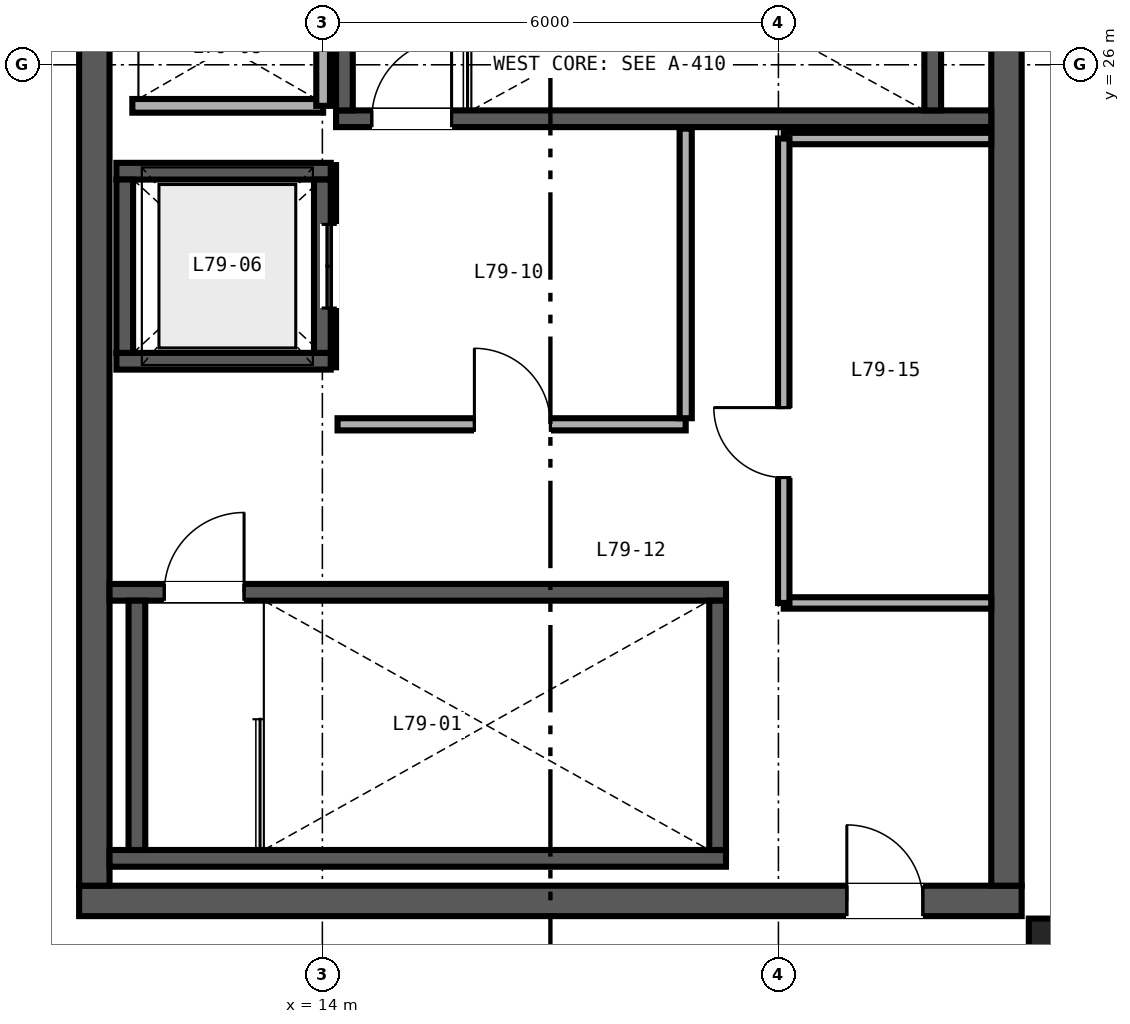
"""IFC4 building model, lengths in metres.
Left out: names, types, materials, properties, quantities, classifications, styles, units other than length and angle.
Written with IfcOpenShell. Run it as: python <this file> out.ifc"""

import sys

from ifc_helpers import new_model, si_unit, direction, frame, frame_2d, origin, origin_2d, place, context, subcontext, project, spatial, rectangle, i_section, extrude, source, transform, mapped, element, fill, save


model = new_model("IFC4")
c1 = context("Model", 3, precision=1e-05, world=origin(), true_north=direction((0.0, 1.0)))
c2 = subcontext(c1, "Body", "Model", "MODEL_VIEW")
j1 = project(units=[si_unit("LENGTHUNIT", "METRE"), si_unit("PLANEANGLEUNIT", "RADIAN")], contexts=[c1])
p1 = place(None, origin())
s1 = spatial("IfcSite", under=j1, at=p1, CompositionType="ELEMENT")
p2 = place(p1, origin())
s2 = spatial("IfcBuilding", under=s1, at=p2, CompositionType="ELEMENT")
p3 = place(p2, frame((0.0, 0.0, 309.6)))
s3 = spatial("IfcBuildingStorey", under=s2, at=p3, CompositionType="ELEMENT", Elevation=309.6)
p4 = place(p3, frame((10.8, 15.0, 0.0), z_axis=(0.0, 0.0, 1.0), x_axis=(1.0, 0.0, 0.0)))
e1 = element("IfcWall", 1, at=p4, inside=s3, PredefinedType="SHEAR", context=c2, shape_type="SweptSolid", body=[
    extrude(rectangle(XDim=12.4, YDim=0.4, at=frame_2d((6.2, 0.0))), origin(), (0.0, 0.0, 1.0), 5.0),
])
p5 = place(p4, frame((10.1, 0.0, 0.0)))
e2 = element("IfcOpeningElement", 2, at=p5, cuts=e1, PredefinedType="OPENING", context=c2, shape_type="SweptSolid", body=[
    extrude(rectangle(XDim=1.0, YDim=2.15, at=frame_2d((0.5, 1.075))), frame((0.0, 0.21, 0.0), z_axis=(0.0, -1.0, 0.0), x_axis=(1.0, 0.0, 0.0)), (0.0, 0.0, 1.0), 0.42),
])
for number, where, z_axis, x_axis in (
    (3, (11.0, 15.2, 0.0), (0.0, 0.0, 1.0), (0.0, 1.0, 0.0)),
    (4, (23.0, 15.2, 0.0), (0.0, 0.0, 1.0), (0.0, 1.0, 0.0)),
):
    element("IfcWall", number, at=place(p3, frame(where, z_axis=z_axis, x_axis=x_axis)), inside=s3, PredefinedType="SHEAR", context=c2, shape_type="SweptSolid", body=[
        extrude(rectangle(XDim=21.6, YDim=0.4, at=frame_2d((10.8, 0.0))), origin(), (0.0, 0.0, 1.0), 5.0),
    ])
p6 = place(p3, frame((11.2, 15.56, 0.0), z_axis=(0.0, 0.0, 1.0), x_axis=(1.0, 0.0, 0.0)))
e5 = element("IfcWall", 5, at=p6, inside=s3, PredefinedType="SHEAR", context=c2, shape_type="SweptSolid", body=[
    extrude(rectangle(XDim=8.11, YDim=0.22, at=frame_2d((4.055, 0.0))), origin(), (0.0, 0.0, 1.0), 5.0),
])
p7 = place(p3, frame((11.2, 19.06, 0.0), z_axis=(0.0, 0.0, 1.0), x_axis=(1.0, 0.0, 0.0)))
e6 = element("IfcWall", 6, at=p7, inside=s3, PredefinedType="SHEAR", context=c2, shape_type="SweptSolid", body=[
    extrude(rectangle(XDim=8.11, YDim=0.22, at=frame_2d((4.055, 0.0))), origin(), (0.0, 0.0, 1.0), 5.0),
])
p8 = place(p7, frame((0.72, 0.0, 0.0)))
e7 = element("IfcOpeningElement", 7, at=p8, cuts=e6, PredefinedType="OPENING", context=c2, shape_type="SweptSolid", body=[
    extrude(rectangle(XDim=1.05, YDim=2.15, at=frame_2d((0.525, 1.075))), frame((0.0, 0.12, 0.0), z_axis=(0.0, -1.0, 0.0), x_axis=(1.0, 0.0, 0.0)), (0.0, 0.0, 1.0), 0.24),
])
for number, where, z_axis, x_axis in (
    (8, (11.56, 15.67, 0.0), (0.0, 0.0, 1.0), (0.0, 1.0, 0.0)),
    (9, (19.2, 15.67, 0.0), (0.0, 0.0, 1.0), (0.0, 1.0, 0.0)),
):
    element("IfcWall", number, at=place(p3, frame(where, z_axis=z_axis, x_axis=x_axis)), inside=s3, PredefinedType="SHEAR", context=c2, shape_type="SweptSolid", body=[
        extrude(rectangle(XDim=3.28, YDim=0.22, at=frame_2d((1.64, 0.0))), origin(), (0.0, 0.0, 1.0), 5.0),
    ])
p9 = place(p3, frame((14.18, 25.29, 0.0), z_axis=(0.0, 0.0, 1.0), x_axis=(1.0, 0.0, 0.0)))
e10 = element("IfcWall", 10, at=p9, inside=s3, PredefinedType="SHEAR", context=c2, shape_type="SweptSolid", body=[
    extrude(rectangle(XDim=8.62, YDim=0.22, at=frame_2d((4.31, 0.0))), origin(), (0.0, 0.0, 1.0), 5.0),
])
p10 = place(p9, frame((0.47, 0.0, 0.0)))
e11 = element("IfcOpeningElement", 11, at=p10, cuts=e10, PredefinedType="OPENING", context=c2, shape_type="SweptSolid", body=[
    extrude(rectangle(XDim=1.05, YDim=2.15, at=frame_2d((0.525, 1.075))), frame((0.0, 0.12, 0.0), z_axis=(0.0, -1.0, 0.0), x_axis=(1.0, 0.0, 0.0)), (0.0, 0.0, 1.0), 0.24),
])
for number, where, z_axis, x_axis in (
    (12, (14.29, 25.4, 0.0), (0.0, 0.0, 1.0), (0.0, 1.0, 0.0)),
    (13, (22.03, 25.4, 0.0), (0.0, 0.0, 1.0), (0.0, 1.0, 0.0)),
):
    element("IfcWall", number, at=place(p3, frame(where, z_axis=z_axis, x_axis=x_axis)), inside=s3, PredefinedType="SHEAR", context=c2, shape_type="SweptSolid", body=[
        extrude(rectangle(XDim=3.28, YDim=0.22, at=frame_2d((1.64, 0.0))), origin(), (0.0, 0.0, 1.0), 5.0),
    ])
m1 = source(origin(), c2, "Body", "SweptSolid", [
    extrude(i_section(OverallWidth=0.412, OverallDepth=0.435, WebThickness=0.036, FlangeThickness=0.057, FilletRadius=0.025, at=origin_2d()), origin(), (0.0, 0.0, 1.0), 5.0),
])
p11 = place(p3, frame((23.5, 14.55, 0.0), z_axis=(0.0, 0.0, 1.0), x_axis=(1.0, 0.0, 0.0)))
e14 = element("IfcColumn", 14, at=p11, inside=s3, PredefinedType="COLUMN", context=c2, shape_type="MappedRepresentation", body=[
    mapped(m1, transform((0.0, 0.0, 0.0), scale=1.0)),
])
for number, where, z_axis, x_axis in (
    (15, (11.5, 22.11, 0.0), (0.0, 0.0, 1.0), (1.0, 0.0, 0.0)),
    (16, (11.5, 24.59, 0.0), (0.0, 0.0, 1.0), (1.0, 0.0, 0.0)),
):
    element("IfcWall", number, at=place(p3, frame(where, z_axis=z_axis, x_axis=x_axis)), inside=s3, PredefinedType="SOLIDWALL", context=c2, shape_type="SweptSolid", body=[
        extrude(rectangle(XDim=2.5, YDim=0.18, at=frame_2d((1.25, 0.0))), origin(), (0.0, 0.0, 1.0), 4.591),
    ])
p12 = place(p3, frame((14.09, 22.02, 0.0), z_axis=(0.0, 0.0, 1.0), x_axis=(0.0, 1.0, 0.0)))
e17 = element("IfcWall", 17, at=p12, inside=s3, PredefinedType="SOLIDWALL", context=c2, shape_type="SweptSolid", body=[
    extrude(rectangle(XDim=2.66, YDim=0.18, at=frame_2d((1.33, 0.0))), origin(), (0.0, 0.0, 1.0), 4.591),
])
p13 = place(p12, frame((0.78, 0.0, 0.0)))
e18 = element("IfcOpeningElement", 18, at=p13, cuts=e17, PredefinedType="OPENING", context=c2, shape_type="SweptSolid", body=[
    extrude(rectangle(XDim=1.1, YDim=2.2, at=frame_2d((0.55, 1.1))), frame((0.0, 0.1, 0.0), z_axis=(0.0, -1.0, 0.0), x_axis=(1.0, 0.0, 0.0)), (0.0, 0.0, 1.0), 0.2),
])
p14 = place(p3, frame((11.5, 25.46, 0.0), z_axis=(0.0, 0.0, 1.0), x_axis=(1.0, 0.0, 0.0)))
e19 = element("IfcWall", 19, at=p14, inside=s3, PredefinedType="SOLIDWALL", context=c2, shape_type="SweptSolid", body=[
    extrude(rectangle(XDim=2.51, YDim=0.18, at=frame_2d((1.255, 0.0))), origin(), (0.0, 0.0, 1.0), 5.0),
])
p15 = place(p3, frame((14.01, 25.46, 0.0), z_axis=(0.0, 0.0, 1.0), x_axis=(0.0, 1.0, 0.0)))
e20 = element("IfcWall", 20, at=p15, inside=s3, PredefinedType="SOLIDWALL", context=c2, shape_type="SweptSolid", body=[
    extrude(rectangle(XDim=3.08, YDim=0.18, at=frame_2d((1.54, 0.0))), origin(), (0.0, 0.0, 1.0), 5.0),
])
p16 = place(p3, frame((14.2, 21.27, 0.0), z_axis=(0.0, 0.0, 1.0), x_axis=(1.0, 0.0, 0.0)))
e21 = element("IfcWall", 21, at=p16, inside=s3, PredefinedType="PARTITIONING", context=c2, shape_type="SweptSolid", body=[
    extrude(rectangle(XDim=4.58, YDim=0.16, at=frame_2d((2.29, 0.0))), origin(), (0.0, 0.0, 1.0), 5.0),
])
p17 = place(p16, frame((1.8, 0.0, 0.0)))
e22 = element("IfcOpeningElement", 22, at=p17, cuts=e21, PredefinedType="OPENING", context=c2, shape_type="SweptSolid", body=[
    extrude(rectangle(XDim=1.0, YDim=2.15, at=frame_2d((0.5, 1.075))), frame((0.0, 0.09, 0.0), z_axis=(0.0, -1.0, 0.0), x_axis=(1.0, 0.0, 0.0)), (0.0, 0.0, 1.0), 0.18),
])
p18 = place(p3, frame((18.78, 21.35, 0.0), z_axis=(0.0, 0.0, 1.0), x_axis=(0.0, 1.0, 0.0)))
e23 = element("IfcWall", 23, at=p18, inside=s3, PredefinedType="PARTITIONING", context=c2, shape_type="SweptSolid", body=[
    extrude(rectangle(XDim=3.81, YDim=0.16, at=frame_2d((1.905, 0.0))), origin(), (0.0, 0.0, 1.0), 4.591),
])
for number, where, z_axis, x_axis in (
    (24, (20.07, 18.92, 0.0), (0.0, 0.0, 1.0), (1.0, 0.0, 0.0)),
    (25, (20.07, 25.03, 0.0), (0.0, 0.0, 1.0), (1.0, 0.0, 0.0)),
):
    element("IfcWall", number, at=place(p3, frame(where, z_axis=z_axis, x_axis=x_axis)), inside=s3, PredefinedType="PARTITIONING", context=c2, shape_type="SweptSolid", body=[
        extrude(rectangle(XDim=2.73, YDim=0.15, at=frame_2d((1.365, 0.0))), origin(), (0.0, 0.0, 1.0), 5.0),
    ])
p19 = place(p3, frame((20.07, 18.92, 0.0), z_axis=(0.0, 0.0, 1.0), x_axis=(0.0, 1.0, 0.0)))
e26 = element("IfcWall", 26, at=p19, inside=s3, PredefinedType="PARTITIONING", context=c2, shape_type="SweptSolid", body=[
    extrude(rectangle(XDim=6.11, YDim=0.15, at=frame_2d((3.055, 0.0))), origin(), (0.0, 0.0, 1.0), 4.1),
])
p20 = place(p19, frame((1.65, 0.0, 0.0)))
e27 = element("IfcOpeningElement", 27, at=p20, cuts=e26, PredefinedType="OPENING", context=c2, shape_type="SweptSolid", body=[
    extrude(rectangle(XDim=0.92, YDim=2.15, at=frame_2d((0.46, 1.075))), frame((0.0, 0.085, 0.0), z_axis=(0.0, -1.0, 0.0), x_axis=(1.0, 0.0, 0.0)), (0.0, 0.0, 1.0), 0.17),
])
for number, where, z_axis, x_axis in (
    (28, (11.29, 22.1, 5.0), (0.0, 0.0, 1.0), (1.0, 0.0, 0.0)),
    (29, (11.29, 24.6, 5.0), (0.0, 0.0, 1.0), (1.0, 0.0, 0.0)),
):
    element("IfcWall", number, at=place(p3, frame(where, z_axis=z_axis, x_axis=x_axis)), inside=s3, PredefinedType="SHEAR", context=c2, shape_type="SweptSolid", body=[
        extrude(rectangle(XDim=2.82, YDim=0.22, at=frame_2d((1.41, 0.0))), origin(), (0.0, 0.0, 1.0), 3.4),
    ])
for number, where, z_axis, x_axis in (
    (30, (11.4, 22.21, 5.0), (0.0, 0.0, 1.0), (0.0, 1.0, 0.0)),
    (31, (14.0, 22.21, 5.0), (0.0, 0.0, 1.0), (0.0, 1.0, 0.0)),
):
    element("IfcWall", number, at=place(p3, frame(where, z_axis=z_axis, x_axis=x_axis)), inside=s3, PredefinedType="SHEAR", context=c2, shape_type="SweptSolid", body=[
        extrude(rectangle(XDim=2.28, YDim=0.22, at=frame_2d((1.14, 0.0))), origin(), (0.0, 0.0, 1.0), 3.4),
    ])
m2 = source(origin(), c2, "Body", "SweptSolid", [
    extrude(rectangle(XDim=1.05, YDim=2.15, at=frame_2d((0.525, 1.075))), frame((0.0, 0.025, 0.0), z_axis=(0.0, -1.0, 0.0), x_axis=(1.0, 0.0, 0.0)), (0.0, 0.0, 1.0), 0.05),
])
p21 = place(p8, origin())
e32 = element("IfcDoor", 32, at=p21, inside=s3, OperationType="SINGLE_SWING_RIGHT", PredefinedType="DOOR", context=c2, shape_type="MappedRepresentation", body=[
    mapped(m2, transform((0.0, 0.0, 0.0), scale=1.0)),
])
fill(e7, e32)
p22 = place(p10, origin())
e33 = element("IfcDoor", 33, at=p22, inside=s3, OperationType="SINGLE_SWING_RIGHT", PredefinedType="DOOR", context=c2, shape_type="MappedRepresentation", body=[
    mapped(m2, transform((0.0, 0.0, 0.0), scale=1.0)),
])
fill(e11, e33)
m3 = source(origin(), c2, "Body", "SweptSolid", [
    extrude(rectangle(XDim=1.1, YDim=2.2, at=frame_2d((0.55, 1.1))), frame((0.0, 0.025, 0.0), z_axis=(0.0, -1.0, 0.0), x_axis=(1.0, 0.0, 0.0)), (0.0, 0.0, 1.0), 0.05),
])
p23 = place(p13, origin())
e34 = element("IfcDoor", 34, at=p23, inside=s3, OperationType="DOUBLE_DOOR_SLIDING", PredefinedType="DOOR", context=c2, shape_type="MappedRepresentation", body=[
    mapped(m3, transform((0.0, 0.0, 0.0), scale=1.0)),
])
fill(e18, e34)
m4 = source(origin(), c2, "Body", "SweptSolid", [
    extrude(rectangle(XDim=1.0, YDim=2.15, at=frame_2d((0.5, 1.075))), frame((0.0, 0.025, 0.0), z_axis=(0.0, -1.0, 0.0), x_axis=(1.0, 0.0, 0.0)), (0.0, 0.0, 1.0), 0.05),
])
p24 = place(p17, origin())
e35 = element("IfcDoor", 35, at=p24, inside=s3, OperationType="SINGLE_SWING_LEFT", PredefinedType="DOOR", context=c2, shape_type="MappedRepresentation", body=[
    mapped(m4, transform((0.0, 0.0, 0.0), scale=1.0)),
])
fill(e22, e35)
p25 = place(p5, origin())
e36 = element("IfcDoor", 36, at=p25, inside=s3, OperationType="SINGLE_SWING_LEFT", PredefinedType="DOOR", context=c2, shape_type="MappedRepresentation", body=[
    mapped(m4, transform((0.0, 0.0, 0.0), scale=1.0)),
])
fill(e2, e36)
m5 = source(origin(), c2, "Body", "SweptSolid", [
    extrude(rectangle(XDim=0.92, YDim=2.15, at=frame_2d((0.46, 1.075))), frame((0.0, 0.025, 0.0), z_axis=(0.0, -1.0, 0.0), x_axis=(1.0, 0.0, 0.0)), (0.0, 0.0, 1.0), 0.05),
])
p26 = place(p20, origin())
e37 = element("IfcDoor", 37, at=p26, inside=s3, OperationType="SINGLE_SWING_RIGHT", PredefinedType="DOOR", context=c2, shape_type="MappedRepresentation", body=[
    mapped(m5, transform((0.0, 0.0, 0.0), scale=1.0)),
])
fill(e27, e37)
save(model, sys.argv[1])
